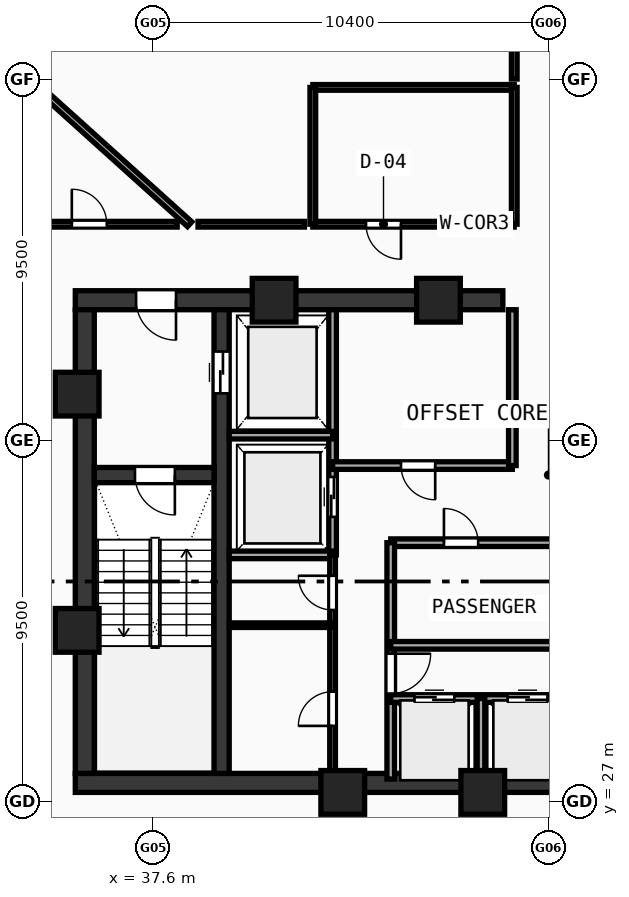
"""IFC4 building model, lengths in metres.
Left out: names, types, materials, properties, quantities, classifications, styles, units other than length and angle.
Written with IfcOpenShell. Run it as: python <this file> out.ifc"""

import sys

from ifc_helpers import new_model, si_unit, direction, frame, frame_2d, origin, origin_with_axes, origin_2d, place, context, subcontext, project, spatial, rectangle, hollow_rectangle, extrude, source, transform, mapped, element, fill, save


model = new_model("IFC4")
c1 = context("Model", 3, precision=1e-05, world=origin(), true_north=direction((0.0, 1.0)))
c2 = subcontext(c1, "Body", "Model", "MODEL_VIEW")
j1 = project(units=[si_unit("LENGTHUNIT", "METRE"), si_unit("PLANEANGLEUNIT", "RADIAN")], contexts=[c1])
p1 = place(None, origin())
s1 = spatial("IfcSite", under=j1, at=p1, CompositionType="ELEMENT")
p2 = place(p1, origin())
s2 = spatial("IfcBuilding", under=s1, at=p2, CompositionType="ELEMENT")
p3 = place(p2, frame((0.0, 0.0, 288.75)))
s3 = spatial("IfcBuildingStorey", under=s2, at=p3, CompositionType="ELEMENT", Elevation=288.75)
p4 = place(p3, frame((35.55, 27.5, 0.0), z_axis=(0.0, 0.0, 1.0), x_axis=(1.0, 0.0, 0.0)))
e1 = element("IfcWall", 1, at=p4, inside=s3, PredefinedType="SHEAR", context=c2, shape_type="SweptSolid", body=[
    extrude(rectangle(XDim=24.9, YDim=0.5, at=frame_2d((12.45, 0.0))), origin(), (0.0, 0.0, 1.0), 3.47),
])
p5 = place(p3, frame((35.55, 40.2, 0.0), z_axis=(0.0, 0.0, 1.0), x_axis=(1.0, 0.0, 0.0)))
e2 = element("IfcWall", 2, at=p5, inside=s3, PredefinedType="SHEAR", context=c2, shape_type="SweptSolid", body=[
    extrude(rectangle(XDim=11.25, YDim=0.5, at=frame_2d((5.625, 0.0))), origin(), (0.0, 0.0, 1.0), 3.47),
])
p6 = place(p5, frame((1.6, 0.0, 0.0)))
e3 = element("IfcOpeningElement", 3, at=p6, cuts=e2, PredefinedType="OPENING", context=c2, shape_type="SweptSolid", body=[
    extrude(rectangle(XDim=1.05, YDim=2.1, at=frame_2d((0.525, 1.05))), frame((0.0, 0.26, 0.0), z_axis=(0.0, -1.0, 0.0), x_axis=(1.0, 0.0, 0.0)), (0.0, 0.0, 1.0), 0.52),
])
p7 = place(p3, frame((35.8, 27.75, 0.0), z_axis=(0.0, 0.0, 1.0), x_axis=(0.0, 1.0, 0.0)))
e4 = element("IfcWall", 4, at=p7, inside=s3, PredefinedType="SHEAR", context=c2, shape_type="SweptSolid", body=[
    extrude(rectangle(XDim=12.2, YDim=0.5, at=frame_2d((6.1, 0.0))), origin(), (0.0, 0.0, 1.0), 3.47),
])
p8 = place(p3, frame((39.4, 27.75, 0.0), z_axis=(0.0, 0.0, 1.0), x_axis=(0.0, 1.0, 0.0)))
e5 = element("IfcWall", 5, at=p8, inside=s3, PredefinedType="SHEAR", context=c2, shape_type="SweptSolid", body=[
    extrude(rectangle(XDim=12.2, YDim=0.4, at=frame_2d((6.1, 0.0))), origin(), (0.0, 0.0, 1.0), 3.47),
])
p9 = place(p8, frame((10.0, 0.0, 0.0)))
e6 = element("IfcOpeningElement", 6, at=p9, cuts=e5, PredefinedType="OPENING", context=c2, shape_type="SweptSolid", body=[
    extrude(rectangle(XDim=1.1, YDim=2.1, at=frame_2d((0.55, 1.05))), frame((0.0, 0.21, 0.0), z_axis=(0.0, -1.0, 0.0), x_axis=(1.0, 0.0, 0.0)), (0.0, 0.0, 1.0), 0.42),
])
p10 = place(p3, frame((36.05, 35.6, 0.0), z_axis=(0.0, 0.0, 1.0), x_axis=(1.0, 0.0, 0.0)))
e7 = element("IfcWall", 7, at=p10, inside=s3, PredefinedType="SHEAR", context=c2, shape_type="SweptSolid", body=[
    extrude(rectangle(XDim=3.15, YDim=0.4, at=frame_2d((1.575, 0.0))), origin(), (0.0, 0.0, 1.0), 3.47),
])
p11 = place(p10, frame((1.07, 0.0, 0.0)))
e8 = element("IfcOpeningElement", 8, at=p11, cuts=e7, PredefinedType="OPENING", context=c2, shape_type="SweptSolid", body=[
    extrude(rectangle(XDim=1.05, YDim=2.1, at=frame_2d((0.525, 1.05))), frame((0.0, 0.21, 0.0), z_axis=(0.0, -1.0, 0.0), x_axis=(1.0, 0.0, 0.0)), (0.0, 0.0, 1.0), 0.42),
])
m1 = source(origin(), c2, "Body", "SweptSolid", [
    extrude(hollow_rectangle(XDim=1.15, YDim=1.15, WallThickness=0.048, at=origin_2d()), origin(), (0.0, 0.0, 1.0), 3.73),
])
for number, where, z_axis, x_axis in (
    (9, (42.588, 27.25, -0.26), (0.0, 0.0, 1.0), (1.0, 0.0, 0.0)),
    (10, (46.272, 27.25, -0.26), (0.0, 0.0, 1.0), (1.0, 0.0, 0.0)),
    (11, (45.106, 40.2, -0.26), (0.0, 0.0, 1.0), (1.0, 0.0, 0.0)),
    (12, (40.781, 40.2, -0.26), (0.0, 0.0, 1.0), (1.0, 0.0, 0.0)),
    (13, (35.6, 37.729, -0.26), (0.0, 0.0, 1.0), (1.0, 0.0, 0.0)),
    (14, (35.6, 31.513, -0.26), (0.0, 0.0, 1.0), (1.0, 0.0, 0.0)),
):
    element("IfcColumn", number, at=place(p3, frame(where, z_axis=z_axis, x_axis=x_axis)), inside=s3, PredefinedType="COLUMN", context=c2, shape_type="MappedRepresentation", body=[
        mapped(m1, transform((0.0, 0.0, 0.0), scale=1.0)),
    ])
p12 = place(p3, frame((42.32, 33.5, 0.0), z_axis=(0.0, 0.0, 1.0), x_axis=(0.0, 1.0, 0.0)))
e15 = element("IfcWall", 15, at=p12, inside=s3, PredefinedType="SOLIDWALL", context=c2, shape_type="SweptSolid", body=[
    extrude(rectangle(XDim=6.45, YDim=0.2, at=frame_2d((3.225, 0.0))), origin(), (0.0, 0.0, 1.0), 3.47),
])
p13 = place(p12, frame((1.0, 0.0, 0.0)))
e16 = element("IfcOpeningElement", 16, at=p13, cuts=e15, PredefinedType="OPENING", context=c2, shape_type="SweptSolid", body=[
    extrude(rectangle(XDim=1.05, YDim=2.1, at=frame_2d((0.525, 1.05))), frame((0.0, 0.11, 0.0), z_axis=(0.0, -1.0, 0.0), x_axis=(1.0, 0.0, 0.0)), (0.0, 0.0, 1.0), 0.22),
])
for number, where, z_axis, x_axis in (
    (17, (39.6, 36.65, 0.0), (0.0, 0.0, 1.0), (1.0, 0.0, 0.0)),
    (18, (39.6, 33.5, 0.0), (0.0, 0.0, 1.0), (1.0, 0.0, 0.0)),
):
    element("IfcWall", number, at=place(p3, frame(where, z_axis=z_axis, x_axis=x_axis)), inside=s3, PredefinedType="SOLIDWALL", context=c2, shape_type="SweptSolid", body=[
        extrude(rectangle(XDim=2.72, YDim=0.2, at=frame_2d((1.36, 0.0))), origin(), (0.0, 0.0, 1.0), 3.47),
    ])
p14 = place(p3, frame((42.32, 35.85, 0.0), z_axis=(0.0, 0.0, 1.0), x_axis=(1.0, 0.0, 0.0)))
e19 = element("IfcWall", 19, at=p14, inside=s3, PredefinedType="SOLIDWALL", context=c2, shape_type="SweptSolid", body=[
    extrude(rectangle(XDim=4.73, YDim=0.2, at=frame_2d((2.365, 0.0))), origin(), (0.0, 0.0, 1.0), 3.47),
])
p15 = place(p14, frame((1.8, 0.0, 0.0)))
e20 = element("IfcOpeningElement", 20, at=p15, cuts=e19, PredefinedType="OPENING", context=c2, shape_type="SweptSolid", body=[
    extrude(rectangle(XDim=0.9, YDim=2.1, at=frame_2d((0.45, 1.05))), frame((0.0, 0.11, 0.0), z_axis=(0.0, -1.0, 0.0), x_axis=(1.0, 0.0, 0.0)), (0.0, 0.0, 1.0), 0.22),
])
p16 = place(p3, frame((47.05, 35.85, 0.0), z_axis=(0.0, 0.0, 1.0), x_axis=(0.0, 1.0, 0.0)))
e21 = element("IfcWall", 21, at=p16, inside=s3, PredefinedType="SOLIDWALL", context=c2, shape_type="SweptSolid", body=[
    extrude(rectangle(XDim=4.1, YDim=0.2, at=frame_2d((2.05, 0.0))), origin(), (0.0, 0.0, 1.0), 3.47),
])
p17 = place(p3, frame((43.85, 33.82, 0.0), z_axis=(0.0, 0.0, 1.0), x_axis=(1.0, 0.0, 0.0)))
e22 = element("IfcWall", 22, at=p17, inside=s3, PredefinedType="SOLIDWALL", context=c2, shape_type="SweptSolid", body=[
    extrude(rectangle(XDim=9.83, YDim=0.2, at=frame_2d((4.915, 0.0))), origin(), (0.0, 0.0, 1.0), 3.47),
])
p18 = place(p17, frame((1.4, 0.0, 0.0)))
e23 = element("IfcOpeningElement", 23, at=p18, cuts=e22, PredefinedType="OPENING", context=c2, shape_type="SweptSolid", body=[
    extrude(rectangle(XDim=0.9, YDim=2.1, at=frame_2d((0.45, 1.05))), frame((0.0, 0.11, 0.0), z_axis=(0.0, -1.0, 0.0), x_axis=(1.0, 0.0, 0.0)), (0.0, 0.0, 1.0), 0.22),
])
p19 = place(p17, frame((5.9, 0.0, 0.0)))
e24 = element("IfcOpeningElement", 24, at=p19, cuts=e22, PredefinedType="OPENING", context=c2, shape_type="SweptSolid", body=[
    extrude(rectangle(XDim=0.9, YDim=2.1, at=frame_2d((0.45, 1.05))), frame((0.0, 0.11, 0.0), z_axis=(0.0, -1.0, 0.0), x_axis=(1.0, 0.0, 0.0)), (0.0, 0.0, 1.0), 0.22),
])
p20 = place(p3, frame((43.85, 27.6, 0.0), z_axis=(0.0, 0.0, 1.0), x_axis=(0.0, 1.0, 0.0)))
e25 = element("IfcWall", 25, at=p20, inside=s3, PredefinedType="SOLIDWALL", context=c2, shape_type="SweptSolid", body=[
    extrude(rectangle(XDim=6.22, YDim=0.2, at=frame_2d((3.11, 0.0))), origin(), (0.0, 0.0, 1.0), 3.47),
])
p21 = place(p20, frame((2.25, 0.0, 0.0)))
e26 = element("IfcOpeningElement", 26, at=p21, cuts=e25, PredefinedType="OPENING", context=c2, shape_type="SweptSolid", body=[
    extrude(rectangle(XDim=1.05, YDim=2.1, at=frame_2d((0.525, 1.05))), frame((0.0, 0.11, 0.0), z_axis=(0.0, -1.0, 0.0), x_axis=(1.0, 0.0, 0.0)), (0.0, 0.0, 1.0), 0.22),
])
p22 = place(p3, frame((43.85, 29.72, 0.0), z_axis=(0.0, 0.0, 1.0), x_axis=(1.0, 0.0, 0.0)))
e27 = element("IfcWall", 27, at=p22, inside=s3, PredefinedType="SOLIDWALL", context=c2, shape_type="SweptSolid", body=[
    extrude(rectangle(XDim=7.2, YDim=0.2, at=frame_2d((3.6, 0.0))), origin(), (0.0, 0.0, 1.0), 3.47),
])
p23 = place(p22, frame((0.625, 0.0, 0.0)))
e28 = element("IfcOpeningElement", 28, at=p23, cuts=e27, PredefinedType="OPENING", context=c2, shape_type="SweptSolid", body=[
    extrude(rectangle(XDim=1.05, YDim=2.1, at=frame_2d((0.525, 1.05))), frame((0.0, 0.11, 0.0), z_axis=(0.0, -1.0, 0.0), x_axis=(1.0, 0.0, 0.0)), (0.0, 0.0, 1.0), 0.22),
])
p24 = place(p22, frame((3.075, 0.0, 0.0)))
e29 = element("IfcOpeningElement", 29, at=p24, cuts=e27, PredefinedType="OPENING", context=c2, shape_type="SweptSolid", body=[
    extrude(rectangle(XDim=1.05, YDim=2.1, at=frame_2d((0.525, 1.05))), frame((0.0, 0.11, 0.0), z_axis=(0.0, -1.0, 0.0), x_axis=(1.0, 0.0, 0.0)), (0.0, 0.0, 1.0), 0.22),
])
p25 = place(p22, frame((5.525, 0.0, 0.0)))
e30 = element("IfcOpeningElement", 30, at=p25, cuts=e27, PredefinedType="OPENING", context=c2, shape_type="SweptSolid", body=[
    extrude(rectangle(XDim=1.05, YDim=2.1, at=frame_2d((0.525, 1.05))), frame((0.0, 0.11, 0.0), z_axis=(0.0, -1.0, 0.0), x_axis=(1.0, 0.0, 0.0)), (0.0, 0.0, 1.0), 0.22),
])
p26 = place(p3, frame((43.85, 31.12, 0.0), z_axis=(0.0, 0.0, 1.0), x_axis=(1.0, 0.0, 0.0)))
e31 = element("IfcWall", 31, at=p26, inside=s3, PredefinedType="SOLIDWALL", context=c2, shape_type="SweptSolid", body=[
    extrude(rectangle(XDim=9.83, YDim=0.2, at=frame_2d((4.915, 0.0))), origin(), (0.0, 0.0, 1.0), 3.47),
])
p27 = place(p3, frame((46.225, 27.6, 0.0), z_axis=(0.0, 0.0, 1.0), x_axis=(0.0, 1.0, 0.0)))
e32 = element("IfcWall", 32, at=p27, inside=s3, PredefinedType="SOLIDWALL", context=c2, shape_type="SweptSolid", body=[
    extrude(rectangle(XDim=2.12, YDim=0.2, at=frame_2d((1.06, 0.0))), origin(), (0.0, 0.0, 1.0), 3.47),
])
p28 = place(p3, frame((42.32, 27.6, 0.0), z_axis=(0.0, 0.0, 1.0), x_axis=(0.0, 1.0, 0.0)))
e33 = element("IfcWall", 33, at=p28, inside=s3, PredefinedType="PARTITIONING", context=c2, shape_type="SweptSolid", body=[
    extrude(rectangle(XDim=5.9, YDim=0.15, at=frame_2d((2.95, 0.0))), origin(), (0.0, 0.0, 1.0), 3.47),
])
p29 = place(p28, frame((1.4, 0.0, 0.0)))
e34 = element("IfcOpeningElement", 34, at=p29, cuts=e33, PredefinedType="OPENING", context=c2, shape_type="SweptSolid", body=[
    extrude(rectangle(XDim=0.9, YDim=2.1, at=frame_2d((0.45, 1.05))), frame((0.0, 0.085, 0.0), z_axis=(0.0, -1.0, 0.0), x_axis=(1.0, 0.0, 0.0)), (0.0, 0.0, 1.0), 0.17),
])
p30 = place(p28, frame((4.45, 0.0, 0.0)))
e35 = element("IfcOpeningElement", 35, at=p30, cuts=e33, PredefinedType="OPENING", context=c2, shape_type="SweptSolid", body=[
    extrude(rectangle(XDim=0.9, YDim=2.1, at=frame_2d((0.45, 1.05))), frame((0.0, 0.085, 0.0), z_axis=(0.0, -1.0, 0.0), x_axis=(1.0, 0.0, 0.0)), (0.0, 0.0, 1.0), 0.17),
])
p31 = place(p3, frame((39.6, 31.65, 0.0), z_axis=(0.0, 0.0, 1.0), x_axis=(1.0, 0.0, 0.0)))
e36 = element("IfcWall", 36, at=p31, inside=s3, PredefinedType="PARTITIONING", context=c2, shape_type="SweptSolid", body=[
    extrude(rectangle(XDim=2.72, YDim=0.12, at=frame_2d((1.36, 0.0))), origin(), (0.0, 0.0, 1.0), 3.47),
])
p32 = place(p3, frame((41.8, 42.2, 0.0), z_axis=(0.0, 0.0, 1.0), x_axis=(1.0, 0.0, 0.0)))
e37 = element("IfcWall", 37, at=p32, inside=s3, PredefinedType="PARTITIONING", context=c2, shape_type="SweptSolid", body=[
    extrude(rectangle(XDim=5.3, YDim=0.15, at=frame_2d((2.65, 0.0))), origin(), (0.0, 0.0, 1.0), 2.87),
])
p33 = place(p32, frame((1.4, 0.0, 0.0)))
e38 = element("IfcOpeningElement", 38, at=p33, cuts=e37, PredefinedType="OPENING", context=c2, shape_type="SweptSolid", body=[
    extrude(rectangle(XDim=0.92, YDim=2.1, at=frame_2d((0.46, 1.05))), frame((0.0, 0.085, 0.0), z_axis=(0.0, -1.0, 0.0), x_axis=(1.0, 0.0, 0.0)), (0.0, 0.0, 1.0), 0.17),
])
p34 = place(p3, frame((41.8, 45.8, 0.0), z_axis=(0.0, 0.0, 1.0), x_axis=(1.0, 0.0, 0.0)))
e39 = element("IfcWall", 39, at=p34, inside=s3, PredefinedType="PARTITIONING", context=c2, shape_type="SweptSolid", body=[
    extrude(rectangle(XDim=5.3, YDim=0.15, at=frame_2d((2.65, 0.0))), origin(), (0.0, 0.0, 1.0), 2.87),
])
for number, where, z_axis, x_axis in (
    (40, (41.8, 42.2, 0.0), (0.0, 0.0, 1.0), (0.0, 1.0, 0.0)),
    (41, (47.1, 42.2, 0.0), (0.0, 0.0, 1.0), (0.0, 1.0, 0.0)),
):
    element("IfcWall", number, at=place(p3, frame(where, z_axis=z_axis, x_axis=x_axis)), inside=s3, PredefinedType="PARTITIONING", context=c2, shape_type="SweptSolid", body=[
        extrude(rectangle(XDim=3.6, YDim=0.15, at=frame_2d((1.8, 0.0))), origin(), (0.0, 0.0, 1.0), 3.47),
    ])
p35 = place(p3, frame((38.56, 42.2, 0.0), z_axis=(0.0, 0.0, 1.0), x_axis=(-0.743145593795, 0.669129753055, 0.0)))
e42 = element("IfcWall", 42, at=p35, inside=s3, PredefinedType="PARTITIONING", context=c2, shape_type="SweptSolid", body=[
    extrude(rectangle(XDim=14.711, YDim=0.17, at=frame_2d((7.355, 0.0))), origin(), (0.0, 0.0, 1.0), 2.87),
])
p36 = place(p3, frame((33.497, 42.2, 0.0), z_axis=(0.0, 0.0, 1.0), x_axis=(1.0, 0.0, 0.0)))
e43 = element("IfcWall", 43, at=p36, inside=s3, PredefinedType="PARTITIONING", context=c2, shape_type="SweptSolid", body=[
    extrude(rectangle(XDim=4.734, YDim=0.15, at=frame_2d((2.367, 0.0))), origin(), (0.0, 0.0, 1.0), 3.12),
])
p37 = place(p36, frame((1.961, 0.0, 0.0)))
e44 = element("IfcOpeningElement", 44, at=p37, cuts=e43, PredefinedType="OPENING", context=c2, shape_type="SweptSolid", body=[
    extrude(rectangle(XDim=0.92, YDim=2.1, at=frame_2d((0.46, 1.05))), frame((0.0, 0.085, 0.0), z_axis=(0.0, -1.0, 0.0), x_axis=(1.0, 0.0, 0.0)), (0.0, 0.0, 1.0), 0.17),
])
p38 = place(p3, frame((38.78, 42.2, 0.0), z_axis=(0.0, 0.0, 1.0), x_axis=(1.0, 0.0, 0.0)))
e45 = element("IfcWall", 45, at=p38, inside=s3, PredefinedType="PARTITIONING", context=c2, shape_type="SweptSolid", body=[
    extrude(rectangle(XDim=2.801, YDim=0.15, at=frame_2d((1.4, 0.0))), origin(), (0.0, 0.0, 1.0), 2.87),
])
p39 = place(p3, frame((47.1, 46.02, 0.0), z_axis=(0.0, 0.0, 1.0), x_axis=(0.0, 1.0, 0.0)))
e46 = element("IfcWall", 46, at=p39, inside=s3, PredefinedType="PARTITIONING", context=c2, shape_type="SweptSolid", body=[
    extrude(rectangle(XDim=6.48, YDim=0.15, at=frame_2d((3.24, 0.0))), origin(), (0.0, 0.0, 1.0), 3.12),
])
p40 = place(p39, frame((2.885, 0.0, 0.0)))
e47 = element("IfcOpeningElement", 47, at=p40, cuts=e46, PredefinedType="OPENING", context=c2, shape_type="SweptSolid", body=[
    extrude(rectangle(XDim=0.98, YDim=2.12, at=frame_2d((0.49, 1.06))), frame((0.0, 0.085, 0.0), z_axis=(0.0, -1.0, 0.0), x_axis=(1.0, 0.0, 0.0)), (0.0, 0.0, 1.0), 0.17),
])
m2 = source(origin(), c2, "Body", "SweptSolid", [
    extrude(rectangle(XDim=1.05, YDim=2.1, at=frame_2d((0.525, 1.05))), frame((0.0, 0.025, 0.0), z_axis=(0.0, -1.0, 0.0), x_axis=(1.0, 0.0, 0.0)), (0.0, 0.0, 1.0), 0.05),
])
p41 = place(p11, frame((1.05, 0.0, 0.0), z_axis=(0.0, 0.0, 1.0), x_axis=(-1.0, 0.0, 0.0)))
e48 = element("IfcDoor", 48, at=p41, inside=s3, OperationType="SINGLE_SWING_LEFT", PredefinedType="DOOR", context=c2, shape_type="MappedRepresentation", body=[
    mapped(m2, transform((0.0, 0.0, 0.0), scale=1.0)),
])
fill(e8, e48)
p42 = place(p6, frame((1.05, 0.0, 0.0), z_axis=(0.0, 0.0, 1.0), x_axis=(-1.0, 0.0, 0.0)))
e49 = element("IfcDoor", 49, at=p42, inside=s3, OperationType="SINGLE_SWING_LEFT", PredefinedType="DOOR", context=c2, shape_type="MappedRepresentation", body=[
    mapped(m2, transform((0.0, 0.0, 0.0), scale=1.0)),
])
fill(e3, e49)
m3 = source(origin(), c2, "Body", "SweptSolid", [
    extrude(rectangle(XDim=1.1, YDim=2.1, at=frame_2d((0.55, 1.05))), frame((0.0, 0.025, 0.0), z_axis=(0.0, -1.0, 0.0), x_axis=(1.0, 0.0, 0.0)), (0.0, 0.0, 1.0), 0.05),
])
p43 = place(p9, frame((1.1, 0.0, 0.0), z_axis=(0.0, 0.0, 1.0), x_axis=(-1.0, 0.0, 0.0)))
e50 = element("IfcDoor", 50, at=p43, inside=s3, OperationType="DOUBLE_DOOR_SLIDING", PredefinedType="DOOR", context=c2, shape_type="MappedRepresentation", body=[
    mapped(m3, transform((0.0, 0.0, 0.0), scale=1.0)),
])
fill(e6, e50)
p44 = place(p13, origin_with_axes())
e51 = element("IfcDoor", 51, at=p44, inside=s3, OperationType="DOUBLE_DOOR_SLIDING", PredefinedType="DOOR", context=c2, shape_type="MappedRepresentation", body=[
    mapped(m2, transform((0.0, 0.0, 0.0), scale=1.0)),
])
fill(e16, e51)
m4 = source(origin(), c2, "Body", "SweptSolid", [
    extrude(rectangle(XDim=0.9, YDim=2.1, at=frame_2d((0.45, 1.05))), frame((0.0, 0.025, 0.0), z_axis=(0.0, -1.0, 0.0), x_axis=(1.0, 0.0, 0.0)), (0.0, 0.0, 1.0), 0.05),
])
p45 = place(p15, frame((0.9, 0.0, 0.0), z_axis=(0.0, 0.0, 1.0), x_axis=(-1.0, 0.0, 0.0)))
e52 = element("IfcDoor", 52, at=p45, inside=s3, OperationType="SINGLE_SWING_LEFT", PredefinedType="DOOR", context=c2, shape_type="MappedRepresentation", body=[
    mapped(m4, transform((0.0, 0.0, 0.0), scale=1.0)),
])
fill(e20, e52)
p46 = place(p18, origin_with_axes())
e53 = element("IfcDoor", 53, at=p46, inside=s3, OperationType="SINGLE_SWING_LEFT", PredefinedType="DOOR", context=c2, shape_type="MappedRepresentation", body=[
    mapped(m4, transform((0.0, 0.0, 0.0), scale=1.0)),
])
fill(e23, e53)
p47 = place(p21, frame((1.05, 0.0, 0.0), z_axis=(0.0, 0.0, 1.0), x_axis=(-1.0, 0.0, 0.0)))
e54 = element("IfcDoor", 54, at=p47, inside=s3, OperationType="SINGLE_SWING_LEFT", PredefinedType="DOOR", context=c2, shape_type="MappedRepresentation", body=[
    mapped(m2, transform((0.0, 0.0, 0.0), scale=1.0)),
])
fill(e26, e54)
p48 = place(p23, origin_with_axes())
e55 = element("IfcDoor", 55, at=p48, inside=s3, OperationType="DOUBLE_DOOR_SLIDING", PredefinedType="DOOR", context=c2, shape_type="MappedRepresentation", body=[
    mapped(m2, transform((0.0, 0.0, 0.0), scale=1.0)),
])
fill(e28, e55)
p49 = place(p24, origin_with_axes())
e56 = element("IfcDoor", 56, at=p49, inside=s3, OperationType="DOUBLE_DOOR_SLIDING", PredefinedType="DOOR", context=c2, shape_type="MappedRepresentation", body=[
    mapped(m2, transform((0.0, 0.0, 0.0), scale=1.0)),
])
fill(e29, e56)
p50 = place(p29, origin_with_axes())
e57 = element("IfcDoor", 57, at=p50, inside=s3, OperationType="SINGLE_SWING_LEFT", PredefinedType="DOOR", context=c2, shape_type="MappedRepresentation", body=[
    mapped(m4, transform((0.0, 0.0, 0.0), scale=1.0)),
])
fill(e34, e57)
p51 = place(p30, origin_with_axes())
e58 = element("IfcDoor", 58, at=p51, inside=s3, OperationType="SINGLE_SWING_RIGHT", PredefinedType="DOOR", context=c2, shape_type="MappedRepresentation", body=[
    mapped(m4, transform((0.0, 0.0, 0.0), scale=1.0)),
])
fill(e35, e58)
m5 = source(origin(), c2, "Body", "SweptSolid", [
    extrude(rectangle(XDim=0.92, YDim=2.1, at=frame_2d((0.46, 1.05))), frame((0.0, 0.025, 0.0), z_axis=(0.0, -1.0, 0.0), x_axis=(1.0, 0.0, 0.0)), (0.0, 0.0, 1.0), 0.05),
])
p52 = place(p33, frame((0.92, 0.0, 0.0), z_axis=(0.0, 0.0, 1.0), x_axis=(-1.0, 0.0, 0.0)))
e59 = element("IfcDoor", 59, at=p52, inside=s3, OperationType="SINGLE_SWING_LEFT", PredefinedType="DOOR", context=c2, shape_type="MappedRepresentation", body=[
    mapped(m5, transform((0.0, 0.0, 0.0), scale=1.0)),
])
fill(e38, e59)
p53 = place(p37, origin_with_axes())
e60 = element("IfcDoor", 60, at=p53, inside=s3, OperationType="SINGLE_SWING_LEFT", PredefinedType="DOOR", context=c2, shape_type="MappedRepresentation", body=[
    mapped(m5, transform((0.0, 0.0, 0.0), scale=1.0)),
])
fill(e44, e60)
save(model, sys.argv[1])
